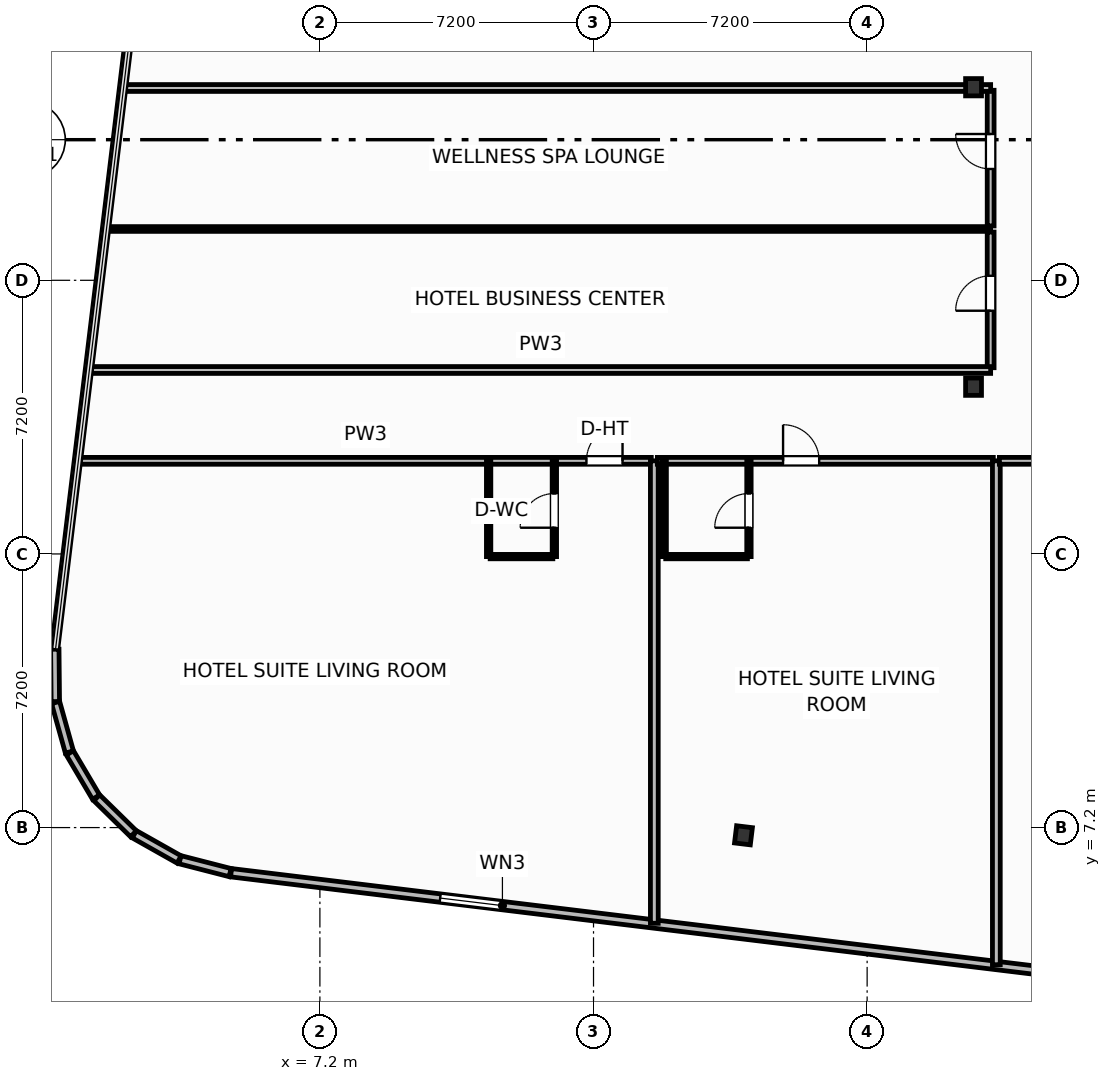
"""IFC4 building model, lengths in metres.
Left out: names, types, materials, properties, quantities, classifications, styles, units other than length and angle.
Written with IfcOpenShell. Run it as: python <this file> out.ifc"""

import sys

from ifc_helpers import new_model, si_unit, direction, frame, frame_2d, origin, origin_2d, place, context, subcontext, project, spatial, rectangle, i_section, extrude, element, fill, save


model = new_model("IFC4")
c1 = context("Model", 3, precision=1e-05, world=origin(), true_north=direction((0.0, 1.0)))
c2 = subcontext(c1, "Body", "Model", "MODEL_VIEW")
j1 = project(units=[si_unit("LENGTHUNIT", "METRE"), si_unit("PLANEANGLEUNIT", "RADIAN")], contexts=[c1])
p1 = place(None, origin())
s1 = spatial("IfcSite", under=j1, at=p1, CompositionType="ELEMENT")
p2 = place(p1, origin())
s2 = spatial("IfcBuilding", under=s1, at=p2, CompositionType="ELEMENT")
p3 = place(p2, frame((0.0, 0.0, 147.6)))
s3 = spatial("IfcBuildingStorey", under=s2, at=p3, CompositionType="ELEMENT", Elevation=147.6)
for number, where, z_axis, x_axis in (
    (1, (24.4, 18.8, 0.0), (0.0, 0.0, 1.0), (1.0, 0.0, 0.0)),
    (2, (24.4, 26.68, 0.0), (0.0, 0.0, 1.0), (1.0, 0.0, 0.0)),
    (3, (18.346, 6.997, 0.0), (0.0, 0.0, 1.0), (0.993, -0.12, 0.0)),
):
    element("IfcColumn", number, at=place(p3, frame(where, z_axis=z_axis, x_axis=x_axis)), inside=s3, PredefinedType="COLUMN", context=c2, shape_type="SweptSolid", body=[
        extrude(i_section(OverallWidth=0.418, OverallDepth=0.455, WebThickness=0.042, FlangeThickness=0.068, FilletRadius=0.025, at=origin_2d()), origin(), (0.0, 0.0, 1.0), 3.7),
    ])
p4 = place(p3, frame((0.224, 11.893, 0.0), z_axis=(0.0, 0.0, 1.0), x_axis=(0.010098705419, -0.999949006774, 0.0)))
e4 = element("IfcWall", 4, at=p4, inside=s3, PredefinedType="SOLIDWALL", context=c2, shape_type="SweptSolid", body=[
    extrude(rectangle(XDim=1.378, YDim=0.22, at=frame_2d((0.689, 0.0))), origin(), (0.0, 0.0, 1.0), 2.73),
])
p5 = place(p3, frame((0.245, 10.491, 0.0), z_axis=(0.0, 0.0, 1.0), x_axis=(0.268853470153, -0.963181089716, 0.0)))
e5 = element("IfcWall", 5, at=p5, inside=s3, PredefinedType="SOLIDWALL", context=c2, shape_type="SweptSolid", body=[
    extrude(rectangle(XDim=1.353, YDim=0.22, at=frame_2d((0.677, 0.0))), origin(), (0.0, 0.0, 1.0), 2.73),
])
p6 = place(p3, frame((0.622, 9.166, 0.0), z_axis=(0.0, 0.0, 1.0), x_axis=(0.508911700393, -0.860818727261, 0.0)))
e6 = element("IfcWall", 6, at=p6, inside=s3, PredefinedType="SOLIDWALL", context=c2, shape_type="SweptSolid", body=[
    extrude(rectangle(XDim=1.353, YDim=0.22, at=frame_2d((0.676, 0.0))), origin(), (0.0, 0.0, 1.0), 2.73),
])
p7 = place(p3, frame((1.328, 7.984, 0.0), z_axis=(0.0, 0.0, 1.0), x_axis=(0.714376989847, -0.69976104234, 0.0)))
e7 = element("IfcWall", 7, at=p7, inside=s3, PredefinedType="SOLIDWALL", context=c2, shape_type="SweptSolid", body=[
    extrude(rectangle(XDim=1.353, YDim=0.22, at=frame_2d((0.677, 0.0))), origin(), (0.0, 0.0, 1.0), 2.73),
])
p8 = place(p3, frame((2.316, 7.025, 0.0), z_axis=(0.0, 0.0, 1.0), x_axis=(0.87113677592, -0.491040443996, 0.0)))
e8 = element("IfcWall", 8, at=p8, inside=s3, PredefinedType="SOLIDWALL", context=c2, shape_type="SweptSolid", body=[
    extrude(rectangle(XDim=1.353, YDim=0.22, at=frame_2d((0.677, 0.0))), origin(), (0.0, 0.0, 1.0), 2.73),
])
p9 = place(p3, frame((3.519, 6.354, 0.0), z_axis=(0.0, 0.0, 1.0), x_axis=(0.968506529347, -0.248988157573, 0.0)))
e9 = element("IfcWall", 9, at=p9, inside=s3, PredefinedType="SOLIDWALL", context=c2, shape_type="SweptSolid", body=[
    extrude(rectangle(XDim=1.361, YDim=0.22, at=frame_2d((0.681, 0.0))), origin(), (0.0, 0.0, 1.0), 2.73),
])
p10 = place(p3, frame((4.862, 6.012, 0.0), z_axis=(0.0, 0.0, 1.0), x_axis=(0.99273213367, -0.120344965739, 0.0)))
e10 = element("IfcWall", 10, at=p10, inside=s3, PredefinedType="SOLIDWALL", context=c2, shape_type="SweptSolid", body=[
    extrude(rectangle(XDim=21.447, YDim=0.22, at=frame_2d((10.724, 0.0))), origin(), (0.0, 0.0, 1.0), 2.73),
])
p11 = place(p10, frame((5.543, 0.0, 0.8)))
e11 = element("IfcOpeningElement", 11, at=p11, cuts=e10, PredefinedType="OPENING", context=c2, shape_type="SweptSolid", body=[
    extrude(rectangle(XDim=1.65, YDim=1.65, at=frame_2d((0.825, 0.825))), frame((0.0, 0.12, 0.0), z_axis=(0.0, -1.0, 0.0), x_axis=(1.0, 0.0, 0.0)), (0.0, 0.0, 1.0), 0.24),
])
p12 = place(p3, frame((0.884, 16.85, 0.0), z_axis=(0.0, 0.0, 1.0), x_axis=(1.0, 0.0, 0.0)))
e12 = element("IfcWall", 12, at=p12, inside=s3, PredefinedType="PARTITIONING", context=c2, shape_type="SweptSolid", body=[
    extrude(rectangle(XDim=15.036, YDim=0.18, at=frame_2d((7.518, 0.0))), origin(), (0.0, 0.0, 1.0), 3.45),
])
p13 = place(p12, frame((13.329, 0.0, 0.0)))
e13 = element("IfcOpeningElement", 13, at=p13, cuts=e12, PredefinedType="OPENING", context=c2, shape_type="SweptSolid", body=[
    extrude(rectangle(XDim=0.95, YDim=2.15, at=frame_2d((0.475, 1.075))), frame((0.0, 0.1, 0.0), z_axis=(0.0, -1.0, 0.0), x_axis=(1.0, 0.0, 0.0)), (0.0, 0.0, 1.0), 0.2),
])
p14 = place(p3, frame((11.68, 14.33, 0.0), z_axis=(0.0, 0.0, 1.0), x_axis=(1.0, 0.0, 0.0)))
e14 = element("IfcWall", 14, at=p14, inside=s3, PredefinedType="PARTITIONING", context=c2, shape_type="SweptSolid", body=[
    extrude(rectangle(XDim=1.65, YDim=0.115, at=frame_2d((0.825, 0.0))), origin(), (0.0, 0.0, 1.0), 3.45),
])
p15 = place(p3, frame((13.37, 14.33, 0.0), z_axis=(0.0, 0.0, 1.0), x_axis=(0.0, 1.0, 0.0)))
e15 = element("IfcWall", 15, at=p15, inside=s3, PredefinedType="PARTITIONING", context=c2, shape_type="SweptSolid", body=[
    extrude(rectangle(XDim=2.52, YDim=0.115, at=frame_2d((1.26, 0.0))), origin(), (0.0, 0.0, 1.0), 3.45),
])
p16 = place(p15, frame((0.76, 0.0, 0.0)))
e16 = element("IfcOpeningElement", 16, at=p16, cuts=e15, PredefinedType="OPENING", context=c2, shape_type="SweptSolid", body=[
    extrude(rectangle(XDim=0.9, YDim=2.05, at=frame_2d((0.45, 1.025))), frame((0.0, 0.067, 0.0), z_axis=(0.0, -1.0, 0.0), x_axis=(1.0, 0.0, 0.0)), (0.0, 0.0, 1.0), 0.135),
])
p17 = place(p3, frame((11.64, 14.33, 0.0), z_axis=(0.0, 0.0, 1.0), x_axis=(0.0, 1.0, 0.0)))
e17 = element("IfcWall", 17, at=p17, inside=s3, PredefinedType="PARTITIONING", context=c2, shape_type="SweptSolid", body=[
    extrude(rectangle(XDim=2.52, YDim=0.115, at=frame_2d((1.26, 0.0))), origin(), (0.0, 0.0, 1.0), 3.45),
])
p18 = place(p3, frame((16.0, 4.682, 0.0), z_axis=(0.0, 0.0, 1.0), x_axis=(0.0, 1.0, 0.0)))
e18 = element("IfcWall", 18, at=p18, inside=s3, PredefinedType="PARTITIONING", context=c2, shape_type="SweptSolid", body=[
    extrude(rectangle(XDim=12.168, YDim=0.205, at=frame_2d((6.084, 0.0))), origin(), (0.0, 0.0, 1.0), 3.45),
])
p19 = place(p3, frame((16.08, 16.85, 0.0), z_axis=(0.0, 0.0, 1.0), x_axis=(1.0, 0.0, 0.0)))
e19 = element("IfcWall", 19, at=p19, inside=s3, PredefinedType="PARTITIONING", context=c2, shape_type="SweptSolid", body=[
    extrude(rectangle(XDim=8.84, YDim=0.18, at=frame_2d((4.42, 0.0))), origin(), (0.0, 0.0, 1.0), 3.45),
])
p20 = place(p19, frame((3.308, 0.0, 0.0)))
e20 = element("IfcOpeningElement", 20, at=p20, cuts=e19, PredefinedType="OPENING", context=c2, shape_type="SweptSolid", body=[
    extrude(rectangle(XDim=0.95, YDim=2.15, at=frame_2d((0.475, 1.075))), frame((0.0, 0.1, 0.0), z_axis=(0.0, -1.0, 0.0), x_axis=(1.0, 0.0, 0.0)), (0.0, 0.0, 1.0), 0.2),
])
p21 = place(p3, frame((16.3, 14.33, 0.0), z_axis=(0.0, 0.0, 1.0), x_axis=(1.0, 0.0, 0.0)))
e21 = element("IfcWall", 21, at=p21, inside=s3, PredefinedType="PARTITIONING", context=c2, shape_type="SweptSolid", body=[
    extrude(rectangle(XDim=2.15, YDim=0.115, at=frame_2d((1.075, 0.0))), origin(), (0.0, 0.0, 1.0), 3.45),
])
p22 = place(p3, frame((18.49, 14.33, 0.0), z_axis=(0.0, 0.0, 1.0), x_axis=(0.0, 1.0, 0.0)))
e22 = element("IfcWall", 22, at=p22, inside=s3, PredefinedType="PARTITIONING", context=c2, shape_type="SweptSolid", body=[
    extrude(rectangle(XDim=2.52, YDim=0.115, at=frame_2d((1.26, 0.0))), origin(), (0.0, 0.0, 1.0), 3.45),
])
p23 = place(p22, frame((0.76, 0.0, 0.0)))
e23 = element("IfcOpeningElement", 23, at=p23, cuts=e22, PredefinedType="OPENING", context=c2, shape_type="SweptSolid", body=[
    extrude(rectangle(XDim=0.9, YDim=2.05, at=frame_2d((0.45, 1.025))), frame((0.0, 0.067, 0.0), z_axis=(0.0, -1.0, 0.0), x_axis=(1.0, 0.0, 0.0)), (0.0, 0.0, 1.0), 0.135),
])
p24 = place(p3, frame((16.26, 14.33, 0.0), z_axis=(0.0, 0.0, 1.0), x_axis=(0.0, 1.0, 0.0)))
e24 = element("IfcWall", 24, at=p24, inside=s3, PredefinedType="PARTITIONING", context=c2, shape_type="SweptSolid", body=[
    extrude(rectangle(XDim=2.52, YDim=0.115, at=frame_2d((1.26, 0.0))), origin(), (0.0, 0.0, 1.0), 3.45),
])
p25 = place(p3, frame((25.0, 3.591, 0.0), z_axis=(0.0, 0.0, 1.0), x_axis=(0.0, 1.0, 0.0)))
e25 = element("IfcWall", 25, at=p25, inside=s3, PredefinedType="PARTITIONING", context=c2, shape_type="SweptSolid", body=[
    extrude(rectangle(XDim=13.259, YDim=0.205, at=frame_2d((6.629, 0.0))), origin(), (0.0, 0.0, 1.0), 2.662),
])
p26 = place(p3, frame((25.08, 16.85, 0.0), z_axis=(0.0, 0.0, 1.0), x_axis=(1.0, 0.0, 0.0)))
e26 = element("IfcWall", 26, at=p26, inside=s3, PredefinedType="PARTITIONING", context=c2, shape_type="SweptSolid", body=[
    extrude(rectangle(XDim=8.84, YDim=0.18, at=frame_2d((4.42, 0.0))), origin(), (0.0, 0.0, 1.0), 3.45),
])
p27 = place(p26, frame((0.918, 0.0, 0.0)))
e27 = element("IfcOpeningElement", 27, at=p27, cuts=e26, PredefinedType="OPENING", context=c2, shape_type="SweptSolid", body=[
    extrude(rectangle(XDim=0.95, YDim=2.15, at=frame_2d((0.475, 1.075))), frame((0.0, 0.1, 0.0), z_axis=(0.0, -1.0, 0.0), x_axis=(1.0, 0.0, 0.0)), (0.0, 0.0, 1.0), 0.2),
])
p28 = place(p3, frame((24.85, 19.3, 0.0), z_axis=(0.0, 0.0, 1.0), x_axis=(0.0, 1.0, 0.0)))
e28 = element("IfcWall", 28, at=p28, inside=s3, PredefinedType="PARTITIONING", context=c2, shape_type="SweptSolid", body=[
    extrude(rectangle(XDim=3.57, YDim=0.18, at=frame_2d((1.785, 0.0))), origin(), (0.0, 0.0, 1.0), 3.45),
])
p29 = place(p28, frame((1.5, 0.0, 0.0)))
e29 = element("IfcOpeningElement", 29, at=p29, cuts=e28, PredefinedType="OPENING", context=c2, shape_type="SweptSolid", body=[
    extrude(rectangle(XDim=0.92, YDim=2.05, at=frame_2d((0.46, 1.025))), frame((0.0, 0.1, 0.0), z_axis=(0.0, -1.0, 0.0), x_axis=(1.0, 0.0, 0.0)), (0.0, 0.0, 1.0), 0.2),
])
p30 = place(p3, frame((24.85, 23.03, 0.0), z_axis=(0.0, 0.0, 1.0), x_axis=(0.0, 1.0, 0.0)))
e30 = element("IfcWall", 30, at=p30, inside=s3, PredefinedType="PARTITIONING", context=c2, shape_type="SweptSolid", body=[
    extrude(rectangle(XDim=3.57, YDim=0.18, at=frame_2d((1.785, 0.0))), origin(), (0.0, 0.0, 1.0), 3.45),
])
p31 = place(p30, frame((1.5, 0.0, 0.0)))
e31 = element("IfcOpeningElement", 31, at=p31, cuts=e30, PredefinedType="OPENING", context=c2, shape_type="SweptSolid", body=[
    extrude(rectangle(XDim=0.92, YDim=2.05, at=frame_2d((0.46, 1.025))), frame((0.0, 0.1, 0.0), z_axis=(0.0, -1.0, 0.0), x_axis=(1.0, 0.0, 0.0)), (0.0, 0.0, 1.0), 0.2),
])
p32 = place(p3, frame((1.624, 22.95, 0.0), z_axis=(0.0, 0.0, 1.0), x_axis=(1.0, 0.0, 0.0)))
e32 = element("IfcWall", 32, at=p32, inside=s3, PredefinedType="PARTITIONING", context=c2, shape_type="SweptSolid", body=[
    extrude(rectangle(XDim=23.226, YDim=0.125, at=frame_2d((11.613, 0.0))), origin(), (0.0, 0.0, 1.0), 3.45),
])
p33 = place(p3, frame((1.174, 19.24, 0.0), z_axis=(0.0, 0.0, 1.0), x_axis=(1.0, 0.0, 0.0)))
e33 = element("IfcWall", 33, at=p33, inside=s3, PredefinedType="PARTITIONING", context=c2, shape_type="SweptSolid", body=[
    extrude(rectangle(XDim=23.676, YDim=0.18, at=frame_2d((11.838, 0.0))), origin(), (0.0, 0.0, 1.0), 3.45),
])
p34 = place(p3, frame((2.073, 26.66, 0.0), z_axis=(0.0, 0.0, 1.0), x_axis=(1.0, 0.0, 0.0)))
e34 = element("IfcWall", 34, at=p34, inside=s3, PredefinedType="PARTITIONING", context=c2, shape_type="SweptSolid", body=[
    extrude(rectangle(XDim=22.777, YDim=0.18, at=frame_2d((11.388, 0.0))), origin(), (0.0, 0.0, 1.0), 2.662),
])
p35 = place(p11, origin())
e35 = element("IfcWindow", 35, at=p35, inside=s3, PartitioningType="SINGLE_PANEL", PredefinedType="WINDOW", context=c2, shape_type="SweptSolid", body=[
    extrude(rectangle(XDim=1.65, YDim=1.65, at=frame_2d((0.825, 0.825))), frame((0.0, 0.03, 0.0), z_axis=(0.0, -1.0, 0.0), x_axis=(1.0, 0.0, 0.0)), (0.0, 0.0, 1.0), 0.06),
])
fill(e11, e35)
p36 = place(p13, origin())
e36 = element("IfcDoor", 36, at=p36, inside=s3, OperationType="SINGLE_SWING_RIGHT", PredefinedType="DOOR", context=c2, shape_type="SweptSolid", body=[
    extrude(rectangle(XDim=0.95, YDim=2.15, at=frame_2d((0.475, 1.075))), frame((0.0, 0.025, 0.0), z_axis=(0.0, -1.0, 0.0), x_axis=(1.0, 0.0, 0.0)), (0.0, 0.0, 1.0), 0.05),
])
fill(e13, e36)
p37 = place(p16, origin())
e37 = element("IfcDoor", 37, at=p37, inside=s3, OperationType="SINGLE_SWING_LEFT", PredefinedType="DOOR", context=c2, shape_type="SweptSolid", body=[
    extrude(rectangle(XDim=0.9, YDim=2.05, at=frame_2d((0.45, 1.025))), frame((0.0, 0.025, 0.0), z_axis=(0.0, -1.0, 0.0), x_axis=(1.0, 0.0, 0.0)), (0.0, 0.0, 1.0), 0.05),
])
fill(e16, e37)
p38 = place(p20, origin())
e38 = element("IfcDoor", 38, at=p38, inside=s3, OperationType="SINGLE_SWING_LEFT", PredefinedType="DOOR", context=c2, shape_type="SweptSolid", body=[
    extrude(rectangle(XDim=0.95, YDim=2.15, at=frame_2d((0.475, 1.075))), frame((0.0, 0.025, 0.0), z_axis=(0.0, -1.0, 0.0), x_axis=(1.0, 0.0, 0.0)), (0.0, 0.0, 1.0), 0.05),
])
fill(e20, e38)
p39 = place(p23, origin())
e39 = element("IfcDoor", 39, at=p39, inside=s3, OperationType="SINGLE_SWING_LEFT", PredefinedType="DOOR", context=c2, shape_type="SweptSolid", body=[
    extrude(rectangle(XDim=0.9, YDim=2.05, at=frame_2d((0.45, 1.025))), frame((0.0, 0.025, 0.0), z_axis=(0.0, -1.0, 0.0), x_axis=(1.0, 0.0, 0.0)), (0.0, 0.0, 1.0), 0.05),
])
fill(e23, e39)
p40 = place(p29, origin())
e40 = element("IfcDoor", 40, at=p40, inside=s3, OperationType="SINGLE_SWING_LEFT", PredefinedType="DOOR", context=c2, shape_type="SweptSolid", body=[
    extrude(rectangle(XDim=0.92, YDim=2.05, at=frame_2d((0.46, 1.025))), frame((0.0, 0.025, 0.0), z_axis=(0.0, -1.0, 0.0), x_axis=(1.0, 0.0, 0.0)), (0.0, 0.0, 1.0), 0.05),
])
fill(e29, e40)
p41 = place(p31, origin())
e41 = element("IfcDoor", 41, at=p41, inside=s3, OperationType="SINGLE_SWING_RIGHT", PredefinedType="DOOR", context=c2, shape_type="SweptSolid", body=[
    extrude(rectangle(XDim=0.92, YDim=2.05, at=frame_2d((0.46, 1.025))), frame((0.0, 0.025, 0.0), z_axis=(0.0, -1.0, 0.0), x_axis=(1.0, 0.0, 0.0)), (0.0, 0.0, 1.0), 0.05),
])
fill(e31, e41)
save(model, sys.argv[1])
